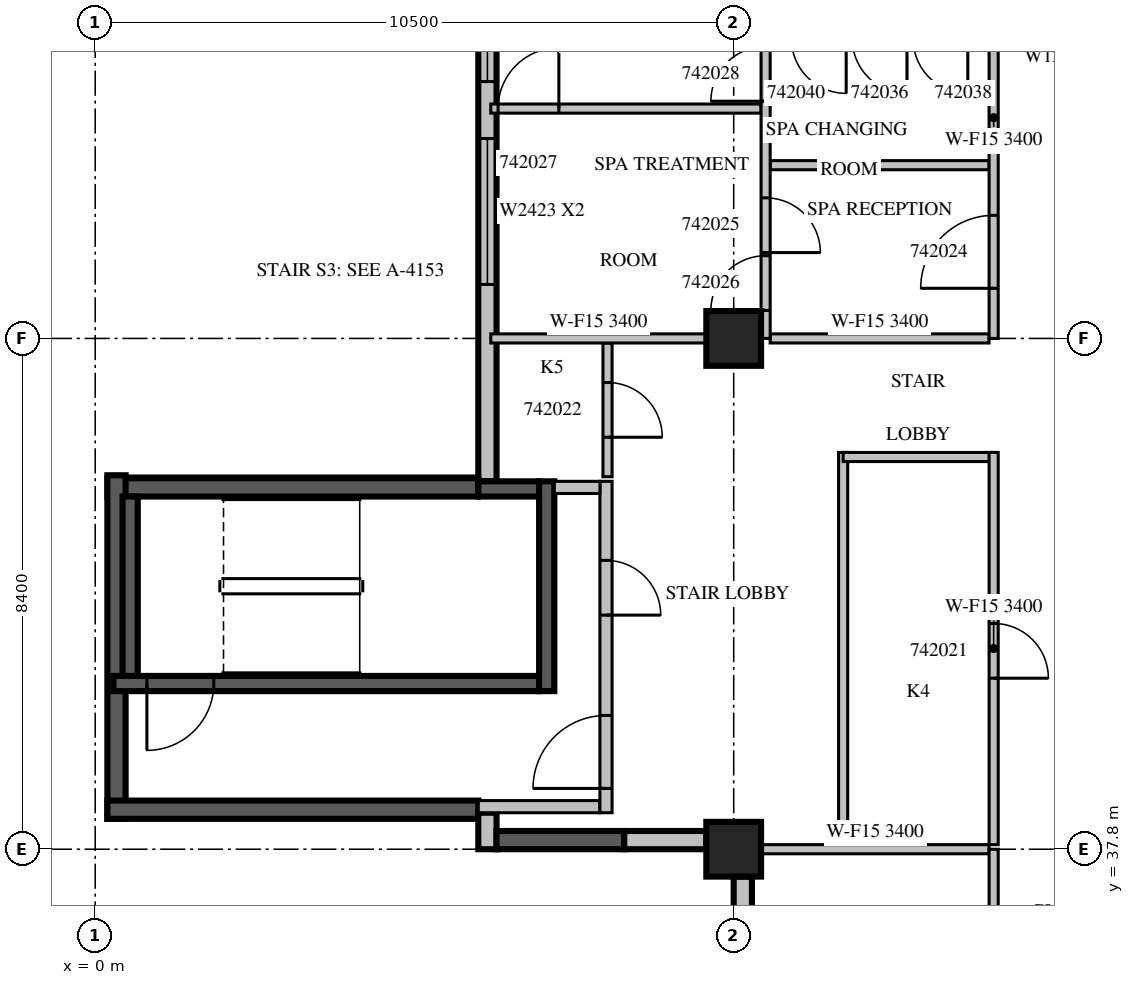
"""IFC4 building model, lengths in metres.
Left out: names, types, materials, properties, quantities, classifications, styles, units other than length and angle.
Written with IfcOpenShell. Run it as: python <this file> out.ifc"""

import sys

from ifc_helpers import new_model, si_unit, direction, frame, frame_2d, origin, origin_2d, place, context, subcontext, project, spatial, rectangle, extrude, source, transform, mapped, element, fill, save


model = new_model("IFC4")
c1 = context("Model", 3, precision=1e-05, world=origin(), true_north=direction((0.0, 1.0)))
c2 = subcontext(c1, "Body", "Model", "MODEL_VIEW")
j1 = project(units=[si_unit("LENGTHUNIT", "METRE"), si_unit("PLANEANGLEUNIT", "RADIAN")], contexts=[c1])
p1 = place(None, origin())
s1 = spatial("IfcSite", under=j1, at=p1, CompositionType="ELEMENT")
p2 = place(p1, origin())
s2 = spatial("IfcBuilding", under=s1, at=p2, CompositionType="ELEMENT")
p3 = place(p2, frame((0.0, 0.0, 193.0)))
s3 = spatial("IfcBuildingStorey", under=s2, at=p3, CompositionType="ELEMENT", Elevation=193.0)
m1 = source(origin(), c2, "Body", "SweptSolid", [
    extrude(rectangle(XDim=0.9, YDim=0.9, at=origin_2d()), origin(), (0.0, 0.0, 1.0), 3.8),
])
for number, where, z_axis, x_axis in (
    (1, (10.5, 37.8, 0.0), (0.0, 0.0, 1.0), (1.0, 0.0, 0.0)),
    (2, (10.5, 46.2, 0.0), (0.0, 0.0, 1.0), (1.0, 0.0, 0.0)),
):
    element("IfcColumn", number, at=place(p3, frame(where, z_axis=z_axis, x_axis=x_axis)), inside=s3, PredefinedType="COLUMN", context=c2, shape_type="MappedRepresentation", body=[
        mapped(m1, transform((0.0, 0.0, 0.0), scale=1.0)),
    ])
m2 = source(origin(), c2, "Body", "SweptSolid", [
    extrude(rectangle(XDim=9.91, YDim=0.3, at=frame_2d((4.955, 0.0))), origin(), (0.0, 0.0, 1.0), 3.4),
])
p4 = place(p3, frame((6.45, 53.76, 0.0), z_axis=(0.0, 0.0, 1.0), x_axis=(0.0, -1.0, 0.0)))
e3 = element("IfcWall", 3, at=p4, inside=s3, PredefinedType="STANDARD", context=c2, shape_type="MappedRepresentation", body=[
    mapped(m2, transform((0.0, 0.0, 0.0), scale=1.0)),
])
m3 = source(origin(), c2, "Body", "SweptSolid", [
    extrude(rectangle(XDim=2.4, YDim=2.3, at=frame_2d((1.2, 1.15))), frame((0.0, 0.16, 0.0), z_axis=(0.0, -1.0, 0.0), x_axis=(1.0, 0.0, 0.0)), (0.0, 0.0, 1.0), 0.32),
])
p5 = place(p4, frame((4.272, 0.0, 0.6)))
e4 = element("IfcOpeningElement", 4, at=p5, cuts=e3, PredefinedType="OPENING", context=c2, shape_type="MappedRepresentation", body=[
    mapped(m3, transform((0.0, 0.0, 0.0), scale=1.0)),
])
p6 = place(p4, frame((0.936, 0.0, 0.6)))
e5 = element("IfcOpeningElement", 5, at=p6, cuts=e3, PredefinedType="OPENING", context=c2, shape_type="MappedRepresentation", body=[
    mapped(m3, transform((0.0, 0.0, 0.0), scale=1.0)),
])
m4 = source(origin(), c2, "Body", "SweptSolid", [
    extrude(rectangle(XDim=6.1, YDim=0.3, at=frame_2d((3.05, 0.0))), origin(), (0.0, 0.0, 1.0), 3.4),
])
p7 = place(p3, frame((6.3, 43.75, 0.0), z_axis=(0.0, 0.0, 1.0), x_axis=(-1.0, 0.0, 0.0)))
e6 = element("IfcWall", 6, at=p7, inside=s3, PredefinedType="SOLIDWALL", context=c2, shape_type="MappedRepresentation", body=[
    mapped(m4, transform((0.0, 0.0, 0.0), scale=1.0)),
])
m5 = source(origin(), c2, "Body", "SweptSolid", [
    extrude(rectangle(XDim=5.65, YDim=0.3, at=frame_2d((2.825, 0.0))), origin(), (0.0, 0.0, 1.0), 3.4),
])
p8 = place(p3, frame((0.35, 43.95, 0.0), z_axis=(0.0, 0.0, 1.0), x_axis=(0.0, -1.0, 0.0)))
e7 = element("IfcWall", 7, at=p8, inside=s3, PredefinedType="SOLIDWALL", context=c2, shape_type="MappedRepresentation", body=[
    mapped(m5, transform((0.0, 0.0, 0.0), scale=1.0)),
])
p9 = place(p3, frame((0.2, 38.45, 0.0), z_axis=(0.0, 0.0, 1.0), x_axis=(1.0, 0.0, 0.0)))
e8 = element("IfcWall", 8, at=p9, inside=s3, PredefinedType="SOLIDWALL", context=c2, shape_type="MappedRepresentation", body=[
    mapped(m4, transform((0.0, 0.0, 0.0), scale=1.0)),
])
m6 = source(origin(), c2, "Body", "SweptSolid", [
    extrude(rectangle(XDim=0.6, YDim=0.3, at=frame_2d((0.3, 0.0))), origin(), (0.0, 0.0, 1.0), 3.4),
])
p10 = place(p3, frame((6.45, 38.4, 0.0), z_axis=(0.0, 0.0, 1.0), x_axis=(0.0, -1.0, 0.0)))
e9 = element("IfcWall", 9, at=p10, inside=s3, PredefinedType="STANDARD", context=c2, shape_type="MappedRepresentation", body=[
    mapped(m6, transform((0.0, 0.0, 0.0), scale=1.0)),
])
m7 = source(origin(), c2, "Body", "SweptSolid", [
    extrude(rectangle(XDim=2.1, YDim=0.3, at=frame_2d((1.05, 0.0))), origin(), (0.0, 0.0, 1.0), 3.4),
])
p11 = place(p3, frame((6.6, 37.95, 0.0), z_axis=(0.0, 0.0, 1.0), x_axis=(1.0, 0.0, 0.0)))
e10 = element("IfcWall", 10, at=p11, inside=s3, PredefinedType="SOLIDWALL", context=c2, shape_type="MappedRepresentation", body=[
    mapped(m7, transform((0.0, 0.0, 0.0), scale=1.0)),
])
m8 = source(origin(), c2, "Body", "SweptSolid", [
    extrude(rectangle(XDim=1.35, YDim=0.3, at=frame_2d((0.675, 0.0))), origin(), (0.0, 0.0, 1.0), 3.4),
])
p12 = place(p3, frame((8.7, 37.95, 0.0), z_axis=(0.0, 0.0, 1.0), x_axis=(1.0, 0.0, 0.0)))
e11 = element("IfcWall", 11, at=p12, inside=s3, PredefinedType="STANDARD", context=c2, shape_type="MappedRepresentation", body=[
    mapped(m8, transform((0.0, 0.0, 0.0), scale=1.0)),
])
m9 = source(origin(), c2, "Body", "SweptSolid", [
    extrude(rectangle(XDim=7.5, YDim=0.3, at=frame_2d((3.75, 0.0))), origin(), (0.0, 0.0, 1.0), 2.4),
])
p13 = place(p3, frame((10.65, 37.35, 0.0), z_axis=(0.0, 0.0, 1.0), x_axis=(0.0, -1.0, 0.0)))
e12 = element("IfcWall", 12, at=p13, inside=s3, PredefinedType="STANDARD", context=c2, shape_type="MappedRepresentation", body=[
    mapped(m9, transform((0.0, 0.0, 0.0), scale=1.0)),
])
m10 = source(origin(), c2, "Body", "SweptSolid", [
    extrude(rectangle(XDim=7.0, YDim=0.25, at=frame_2d((3.5, 0.0))), origin(), (0.0, 0.0, 1.0), 3.4),
])
p14 = place(p3, frame((0.3, 40.525, 0.0), z_axis=(0.0, 0.0, 1.0), x_axis=(1.0, 0.0, 0.0)))
e13 = element("IfcWall", 13, at=p14, inside=s3, PredefinedType="SOLIDWALL", context=c2, shape_type="MappedRepresentation", body=[
    mapped(m10, transform((0.0, 0.0, 0.0), scale=1.0)),
])
m11 = source(origin(), c2, "Body", "SweptSolid", [
    extrude(rectangle(XDim=1.1, YDim=2.1, at=frame_2d((0.55, 1.05))), frame((0.0, 0.135, 0.0), z_axis=(0.0, -1.0, 0.0), x_axis=(1.0, 0.0, 0.0)), (0.0, 0.0, 1.0), 0.27),
])
p15 = place(p14, frame((0.55, 0.0, 0.0)))
e14 = element("IfcOpeningElement", 14, at=p15, cuts=e13, PredefinedType="OPENING", context=c2, shape_type="MappedRepresentation", body=[
    mapped(m11, transform((0.0, 0.0, 0.0), scale=1.0)),
])
m12 = source(origin(), c2, "Body", "SweptSolid", [
    extrude(rectangle(XDim=1.0, YDim=0.25, at=frame_2d((0.5, 0.0))), origin(), (0.0, 0.0, 1.0), 3.4),
])
p16 = place(p3, frame((6.3, 43.725, 0.0), z_axis=(0.0, 0.0, 1.0), x_axis=(1.0, 0.0, 0.0)))
e15 = element("IfcWall", 15, at=p16, inside=s3, PredefinedType="SOLIDWALL", context=c2, shape_type="MappedRepresentation", body=[
    mapped(m12, transform((0.0, 0.0, 0.0), scale=1.0)),
])
m13 = source(origin(), c2, "Body", "SweptSolid", [
    extrude(rectangle(XDim=3.45, YDim=0.25, at=frame_2d((1.725, 0.0))), origin(), (0.0, 0.0, 1.0), 3.4),
])
p17 = place(p3, frame((7.425, 40.4, 0.0), z_axis=(0.0, 0.0, 1.0), x_axis=(0.0, 1.0, 0.0)))
e16 = element("IfcWall", 16, at=p17, inside=s3, PredefinedType="SOLIDWALL", context=c2, shape_type="MappedRepresentation", body=[
    mapped(m13, transform((0.0, 0.0, 0.0), scale=1.0)),
])
m14 = source(origin(), c2, "Body", "SweptSolid", [
    extrude(rectangle(XDim=2.95, YDim=0.25, at=frame_2d((1.475, 0.0))), origin(), (0.0, 0.0, 1.0), 3.4),
])
p18 = place(p3, frame((0.575, 40.65, 0.0), z_axis=(0.0, 0.0, 1.0), x_axis=(0.0, 1.0, 0.0)))
e17 = element("IfcWall", 17, at=p18, inside=s3, PredefinedType="SOLIDWALL", context=c2, shape_type="MappedRepresentation", body=[
    mapped(m14, transform((0.0, 0.0, 0.0), scale=1.0)),
])
m15 = source(origin(), c2, "Body", "SweptSolid", [
    extrude(rectangle(XDim=2.0, YDim=0.2, at=frame_2d((1.0, 0.0))), origin(), (0.0, 0.0, 1.0), 3.4),
])
p19 = place(p3, frame((6.3, 38.5, 0.0), z_axis=(0.0, 0.0, 1.0), x_axis=(1.0, 0.0, 0.0)))
e18 = element("IfcWall", 18, at=p19, inside=s3, PredefinedType="PARTITIONING", context=c2, shape_type="MappedRepresentation", body=[
    mapped(m15, transform((0.0, 0.0, 0.0), scale=1.0)),
])
m16 = source(origin(), c2, "Body", "SweptSolid", [
    extrude(rectangle(XDim=5.45, YDim=0.2, at=frame_2d((2.725, 0.0))), origin(), (0.0, 0.0, 1.0), 3.4),
])
p20 = place(p3, frame((8.4, 38.4, 0.0), z_axis=(0.0, 0.0, 1.0), x_axis=(0.0, 1.0, 0.0)))
e19 = element("IfcWall", 19, at=p20, inside=s3, PredefinedType="PARTITIONING", context=c2, shape_type="MappedRepresentation", body=[
    mapped(m16, transform((0.0, 0.0, 0.0), scale=1.0)),
])
m17 = source(origin(), c2, "Body", "SweptSolid", [
    extrude(rectangle(XDim=1.2, YDim=2.1, at=frame_2d((0.6, 1.05))), frame((0.0, 0.11, 0.0), z_axis=(0.0, -1.0, 0.0), x_axis=(1.0, 0.0, 0.0)), (0.0, 0.0, 1.0), 0.22),
])
p21 = place(p20, frame((0.4, 0.0, 0.0)))
e20 = element("IfcOpeningElement", 20, at=p21, cuts=e19, PredefinedType="OPENING", context=c2, shape_type="MappedRepresentation", body=[
    mapped(m17, transform((0.0, 0.0, 0.0), scale=1.0)),
])
m18 = source(origin(), c2, "Body", "SweptSolid", [
    extrude(rectangle(XDim=0.9, YDim=2.1, at=frame_2d((0.45, 1.05))), frame((0.0, 0.11, 0.0), z_axis=(0.0, -1.0, 0.0), x_axis=(1.0, 0.0, 0.0)), (0.0, 0.0, 1.0), 0.22),
])
p22 = place(p20, frame((3.25, 0.0, 0.0)))
e21 = element("IfcOpeningElement", 21, at=p22, cuts=e19, PredefinedType="OPENING", context=c2, shape_type="MappedRepresentation", body=[
    mapped(m18, transform((0.0, 0.0, 0.0), scale=1.0)),
])
m19 = source(origin(), c2, "Body", "SweptSolid", [
    extrude(rectangle(XDim=0.75, YDim=0.2, at=frame_2d((0.375, 0.0))), origin(), (0.0, 0.0, 1.0), 3.4),
])
p23 = place(p3, frame((7.55, 43.75, 0.0), z_axis=(0.0, 0.0, 1.0), x_axis=(1.0, 0.0, 0.0)))
e22 = element("IfcWall", 22, at=p23, inside=s3, PredefinedType="PARTITIONING", context=c2, shape_type="MappedRepresentation", body=[
    mapped(m19, transform((0.0, 0.0, 0.0), scale=1.0)),
])
m20 = source(origin(), c2, "Body", "SweptSolid", [
    extrude(rectangle(XDim=6.45, YDim=0.15, at=frame_2d((3.225, 0.0))), origin(), (0.0, 0.0, 1.0), 3.4),
])
p24 = place(p3, frame((12.3, 44.325, 0.0), z_axis=(0.0, 0.0, 1.0), x_axis=(0.0, -1.0, 0.0)))
e23 = element("IfcWall", 23, at=p24, inside=s3, PredefinedType="PARTITIONING", context=c2, shape_type="MappedRepresentation", body=[
    mapped(m20, transform((0.0, 0.0, 0.0), scale=1.0)),
])
p25 = place(p3, frame((14.775, 44.25, 0.0), z_axis=(0.0, 0.0, 1.0), x_axis=(-1.0, 0.0, 0.0)))
e24 = element("IfcWall", 24, at=p25, inside=s3, PredefinedType="PARTITIONING", context=c2, shape_type="SweptSolid", body=[
    extrude(rectangle(XDim=2.475, YDim=0.15, at=frame_2d((1.238, 0.0))), origin(), (0.0, 0.0, 1.0), 3.4),
])
p26 = place(p3, frame((14.775, 37.875, 0.0), z_axis=(0.0, 0.0, 1.0), x_axis=(0.0, 1.0, 0.0)))
e25 = element("IfcWall", 25, at=p26, inside=s3, PredefinedType="PARTITIONING", context=c2, shape_type="MappedRepresentation", body=[
    mapped(m20, transform((0.0, 0.0, 0.0), scale=1.0)),
])
m21 = source(origin(), c2, "Body", "SweptSolid", [
    extrude(rectangle(XDim=0.9, YDim=2.1, at=frame_2d((0.45, 1.05))), frame((0.0, 0.085, 0.0), z_axis=(0.0, -1.0, 0.0), x_axis=(1.0, 0.0, 0.0)), (0.0, 0.0, 1.0), 0.17),
])
p27 = place(p26, frame((2.737, 0.0, 0.0)))
e26 = element("IfcOpeningElement", 26, at=p27, cuts=e25, PredefinedType="OPENING", context=c2, shape_type="MappedRepresentation", body=[
    mapped(m21, transform((0.0, 0.0, 0.0), scale=1.0)),
])
m22 = source(origin(), c2, "Body", "SweptSolid", [
    extrude(rectangle(XDim=2.2, YDim=0.15, at=frame_2d((1.1, 0.0))), origin(), (0.0, 0.0, 1.0), 3.4),
])
p28 = place(p3, frame((8.425, 43.925, 0.0), z_axis=(0.0, 0.0, 1.0), x_axis=(0.0, 1.0, 0.0)))
e27 = element("IfcWall", 27, at=p28, inside=s3, PredefinedType="PARTITIONING", context=c2, shape_type="MappedRepresentation", body=[
    mapped(m22, transform((0.0, 0.0, 0.0), scale=1.0)),
])
p29 = place(p28, frame((0.65, 0.0, 0.0)))
e28 = element("IfcOpeningElement", 28, at=p29, cuts=e27, PredefinedType="OPENING", context=c2, shape_type="MappedRepresentation", body=[
    mapped(m21, transform((0.0, 0.0, 0.0), scale=1.0)),
])
m23 = source(origin(), c2, "Body", "SweptSolid", [
    extrude(rectangle(XDim=3.751, YDim=0.15, at=frame_2d((1.875, 0.0))), origin(), (0.0, 0.0, 1.0), 3.4),
])
p30 = place(p3, frame((14.7, 37.8, 0.0), z_axis=(0.0, 0.0, 1.0), x_axis=(-1.0, 0.0, 0.0)))
e29 = element("IfcWall", 29, at=p30, inside=s3, PredefinedType="PARTITIONING", context=c2, shape_type="MappedRepresentation", body=[
    mapped(m23, transform((0.0, 0.0, 0.0), scale=1.0)),
])
m24 = source(origin(), c2, "Body", "SweptSolid", [
    extrude(rectangle(XDim=4.445, YDim=0.15, at=frame_2d((2.223, 0.0))), origin(), (0.0, 0.0, 1.0), 3.4),
])
p31 = place(p3, frame((10.95, 49.98, 0.0), z_axis=(0.0, 0.0, 1.0), x_axis=(-1.0, 0.0, 0.0)))
e30 = element("IfcWall", 30, at=p31, inside=s3, PredefinedType="PARTITIONING", context=c2, shape_type="MappedRepresentation", body=[
    mapped(m24, transform((0.0, 0.0, 0.0), scale=1.0)),
])
m25 = source(origin(), c2, "Body", "SweptSolid", [
    extrude(rectangle(XDim=1.0, YDim=2.1, at=frame_2d((0.5, 1.05))), frame((0.0, 0.085, 0.0), z_axis=(0.0, -1.0, 0.0), x_axis=(1.0, 0.0, 0.0)), (0.0, 0.0, 1.0), 0.17),
])
p32 = place(p31, frame((3.325, 0.0, 0.0)))
e31 = element("IfcOpeningElement", 31, at=p32, cuts=e30, PredefinedType="OPENING", context=c2, shape_type="MappedRepresentation", body=[
    mapped(m25, transform((0.0, 0.0, 0.0), scale=1.0)),
])
m26 = source(origin(), c2, "Body", "SweptSolid", [
    extrude(rectangle(XDim=3.6, YDim=0.15, at=frame_2d((1.8, 0.0))), origin(), (0.0, 0.0, 1.0), 3.4),
])
p33 = place(p3, frame((14.7, 49.049, 0.0), z_axis=(0.0, 0.0, 1.0), x_axis=(-1.0, 0.0, 0.0)))
e32 = element("IfcWall", 32, at=p33, inside=s3, PredefinedType="PARTITIONING", context=c2, shape_type="MappedRepresentation", body=[
    mapped(m26, transform((0.0, 0.0, 0.0), scale=1.0)),
])
m27 = source(origin(), c2, "Body", "SweptSolid", [
    extrude(rectangle(XDim=3.546, YDim=0.15, at=frame_2d((1.773, 0.0))), origin(), (0.0, 0.0, 1.0), 3.4),
])
p34 = place(p3, frame((10.051, 46.2, 0.0), z_axis=(0.0, 0.0, 1.0), x_axis=(-1.0, 0.0, 0.0)))
e33 = element("IfcWall", 33, at=p34, inside=s3, PredefinedType="PARTITIONING", context=c2, shape_type="MappedRepresentation", body=[
    mapped(m27, transform((0.0, 0.0, 0.0), scale=1.0)),
])
p35 = place(p3, frame((14.7, 46.2, 0.0), z_axis=(0.0, 0.0, 1.0), x_axis=(-1.0, 0.0, 0.0)))
e34 = element("IfcWall", 34, at=p35, inside=s3, PredefinedType="PARTITIONING", context=c2, shape_type="MappedRepresentation", body=[
    mapped(m26, transform((0.0, 0.0, 0.0), scale=1.0)),
])
m28 = source(origin(), c2, "Body", "SweptSolid", [
    extrude(rectangle(XDim=7.26, YDim=0.15, at=frame_2d((3.63, 0.0))), origin(), (0.0, 0.0, 1.0), 3.4),
])
p36 = place(p3, frame((11.025, 46.2, 0.0), z_axis=(0.0, 0.0, 1.0), x_axis=(0.0, 1.0, 0.0)))
e35 = element("IfcWall", 35, at=p36, inside=s3, PredefinedType="PARTITIONING", context=c2, shape_type="MappedRepresentation", body=[
    mapped(m28, transform((0.0, 0.0, 0.0), scale=1.0)),
])
p37 = place(p36, frame((1.412, 0.0, 0.0)))
e36 = element("IfcOpeningElement", 36, at=p37, cuts=e35, PredefinedType="OPENING", context=c2, shape_type="MappedRepresentation", body=[
    mapped(m21, transform((0.0, 0.0, 0.0), scale=1.0)),
])
p38 = place(p36, frame((0.46, 0.0, 0.0)))
e37 = element("IfcOpeningElement", 37, at=p38, cuts=e35, PredefinedType="OPENING", context=c2, shape_type="MappedRepresentation", body=[
    mapped(m21, transform((0.0, 0.0, 0.0), scale=1.0)),
])
p39 = place(p36, frame((3.901, 0.0, 0.0)))
e38 = element("IfcOpeningElement", 38, at=p39, cuts=e35, PredefinedType="OPENING", context=c2, shape_type="MappedRepresentation", body=[
    mapped(m21, transform((0.0, 0.0, 0.0), scale=1.0)),
])
m29 = source(origin(), c2, "Body", "SweptSolid", [
    extrude(rectangle(XDim=8.4, YDim=0.15, at=frame_2d((4.2, 0.0))), origin(), (0.0, 0.0, 1.0), 2.9),
])
p40 = place(p3, frame((14.775, 29.4, 0.0), z_axis=(0.0, 0.0, 1.0), x_axis=(0.0, 1.0, 0.0)))
e39 = element("IfcWall", 39, at=p40, inside=s3, PredefinedType="PARTITIONING", context=c2, shape_type="MappedRepresentation", body=[
    mapped(m29, transform((0.0, 0.0, 0.0), scale=1.0)),
])
m30 = source(origin(), c2, "Body", "SweptSolid", [
    extrude(rectangle(XDim=1.1, YDim=2.1, at=frame_2d((0.55, 1.05))), frame((0.0, 0.085, 0.0), z_axis=(0.0, -1.0, 0.0), x_axis=(1.0, 0.0, 0.0)), (0.0, 0.0, 1.0), 0.17),
])
p41 = place(p40, frame((0.638, 0.0, 0.0)))
e40 = element("IfcOpeningElement", 40, at=p41, cuts=e39, PredefinedType="OPENING", context=c2, shape_type="MappedRepresentation", body=[
    mapped(m30, transform((0.0, 0.0, 0.0), scale=1.0)),
])
p42 = place(p3, frame((14.775, 46.2, 0.0), z_axis=(0.0, 0.0, 1.0), x_axis=(0.0, 1.0, 0.0)))
e41 = element("IfcWall", 41, at=p42, inside=s3, PredefinedType="PARTITIONING", context=c2, shape_type="MappedRepresentation", body=[
    mapped(m28, transform((0.0, 0.0, 0.0), scale=1.0)),
])
m31 = source(origin(), c2, "Body", "SweptSolid", [
    extrude(rectangle(XDim=1.2, YDim=2.1, at=frame_2d((0.6, 1.05))), frame((0.0, 0.085, 0.0), z_axis=(0.0, -1.0, 0.0), x_axis=(1.0, 0.0, 0.0)), (0.0, 0.0, 1.0), 0.17),
])
p43 = place(p42, frame((0.825, 0.0, 0.0)))
e42 = element("IfcOpeningElement", 42, at=p43, cuts=e41, PredefinedType="OPENING", context=c2, shape_type="MappedRepresentation", body=[
    mapped(m31, transform((0.0, 0.0, 0.0), scale=1.0)),
])
m32 = source(origin(), c2, "Body", "SweptSolid", [
    extrude(rectangle(XDim=2.4, YDim=2.3, at=frame_2d((1.2, 1.15))), frame((0.0, 0.03, 0.0), z_axis=(0.0, -1.0, 0.0), x_axis=(1.0, 0.0, 0.0)), (0.0, 0.0, 1.0), 0.06),
])
p44 = place(p5, origin())
e43 = element("IfcWindow", 43, at=p44, inside=s3, PartitioningType="SINGLE_PANEL", PredefinedType="WINDOW", context=c2, shape_type="MappedRepresentation", body=[
    mapped(m32, transform((0.0, 0.0, 0.0), scale=1.0)),
])
fill(e4, e43)
p45 = place(p6, origin())
e44 = element("IfcWindow", 44, at=p45, inside=s3, PartitioningType="SINGLE_PANEL", PredefinedType="WINDOW", context=c2, shape_type="MappedRepresentation", body=[
    mapped(m32, transform((0.0, 0.0, 0.0), scale=1.0)),
])
fill(e5, e44)
m33 = source(origin(), c2, "Body", "SweptSolid", [
    extrude(rectangle(XDim=1.1, YDim=2.1, at=frame_2d((0.55, 1.05))), frame((0.0, 0.025, 0.0), z_axis=(0.0, -1.0, 0.0), x_axis=(1.0, 0.0, 0.0)), (0.0, 0.0, 1.0), 0.05),
])
p46 = place(p15, origin())
e45 = element("IfcDoor", 45, at=p46, inside=s3, OperationType="SINGLE_SWING_RIGHT", PredefinedType="DOOR", context=c2, shape_type="MappedRepresentation", body=[
    mapped(m33, transform((0.0, 0.0, 0.0), scale=1.0)),
])
fill(e14, e45)
m34 = source(origin(), c2, "Body", "SweptSolid", [
    extrude(rectangle(XDim=1.2, YDim=2.1, at=frame_2d((0.6, 1.05))), frame((0.0, 0.025, 0.0), z_axis=(0.0, -1.0, 0.0), x_axis=(1.0, 0.0, 0.0)), (0.0, 0.0, 1.0), 0.05),
])
p47 = place(p21, origin())
e46 = element("IfcDoor", 46, at=p47, inside=s3, OperationType="SINGLE_SWING_LEFT", PredefinedType="DOOR", context=c2, shape_type="MappedRepresentation", body=[
    mapped(m34, transform((0.0, 0.0, 0.0), scale=1.0)),
])
fill(e20, e46)
m35 = source(origin(), c2, "Body", "SweptSolid", [
    extrude(rectangle(XDim=0.9, YDim=2.1, at=frame_2d((0.45, 1.05))), frame((0.0, 0.025, 0.0), z_axis=(0.0, -1.0, 0.0), x_axis=(1.0, 0.0, 0.0)), (0.0, 0.0, 1.0), 0.05),
])
p48 = place(p22, origin())
e47 = element("IfcDoor", 47, at=p48, inside=s3, OperationType="SINGLE_SWING_RIGHT", PredefinedType="DOOR", context=c2, shape_type="MappedRepresentation", body=[
    mapped(m35, transform((0.0, 0.0, 0.0), scale=1.0)),
])
fill(e21, e47)
p49 = place(p27, origin())
e48 = element("IfcDoor", 48, at=p49, inside=s3, OperationType="SINGLE_SWING_RIGHT", PredefinedType="DOOR", context=c2, shape_type="MappedRepresentation", body=[
    mapped(m35, transform((0.0, 0.0, 0.0), scale=1.0)),
])
fill(e26, e48)
p50 = place(p29, origin())
e49 = element("IfcDoor", 49, at=p50, inside=s3, OperationType="SINGLE_SWING_RIGHT", PredefinedType="DOOR", context=c2, shape_type="MappedRepresentation", body=[
    mapped(m35, transform((0.0, 0.0, 0.0), scale=1.0)),
])
fill(e28, e49)
p51 = place(p43, origin())
e50 = element("IfcDoor", 50, at=p51, inside=s3, OperationType="SINGLE_SWING_LEFT", PredefinedType="DOOR", context=c2, shape_type="MappedRepresentation", body=[
    mapped(m34, transform((0.0, 0.0, 0.0), scale=1.0)),
])
fill(e42, e50)
p52 = place(p37, origin())
e51 = element("IfcDoor", 51, at=p52, inside=s3, OperationType="SINGLE_SWING_RIGHT", PredefinedType="DOOR", context=c2, shape_type="MappedRepresentation", body=[
    mapped(m35, transform((0.0, 0.0, 0.0), scale=1.0)),
])
fill(e36, e51)
p53 = place(p38, origin())
e52 = element("IfcDoor", 52, at=p53, inside=s3, OperationType="SINGLE_SWING_LEFT", PredefinedType="DOOR", context=c2, shape_type="MappedRepresentation", body=[
    mapped(m35, transform((0.0, 0.0, 0.0), scale=1.0)),
])
fill(e37, e52)
m36 = source(origin(), c2, "Body", "SweptSolid", [
    extrude(rectangle(XDim=1.0, YDim=2.1, at=frame_2d((0.5, 1.05))), frame((0.0, 0.025, 0.0), z_axis=(0.0, -1.0, 0.0), x_axis=(1.0, 0.0, 0.0)), (0.0, 0.0, 1.0), 0.05),
])
p54 = place(p32, origin())
e53 = element("IfcDoor", 53, at=p54, inside=s3, OperationType="SINGLE_SWING_RIGHT", PredefinedType="DOOR", context=c2, shape_type="MappedRepresentation", body=[
    mapped(m36, transform((0.0, 0.0, 0.0), scale=1.0)),
])
fill(e31, e53)
p55 = place(p39, origin())
e54 = element("IfcDoor", 54, at=p55, inside=s3, OperationType="SINGLE_SWING_LEFT", PredefinedType="DOOR", context=c2, shape_type="MappedRepresentation", body=[
    mapped(m35, transform((0.0, 0.0, 0.0), scale=1.0)),
])
fill(e38, e54)
save(model, sys.argv[1])
